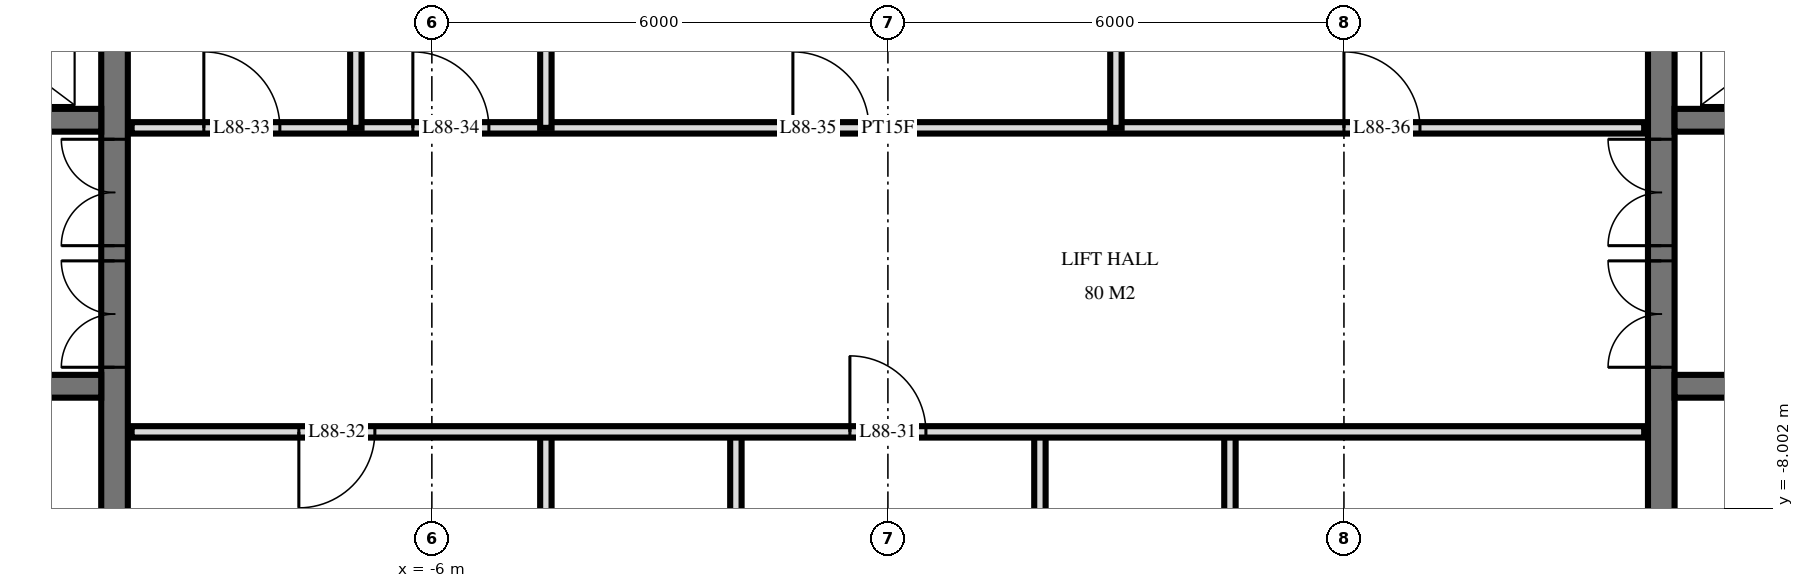
"""IFC4 building model, lengths in metres.
Left out: names, types, materials, properties, quantities, classifications, styles, units other than length and angle.
Written with IfcOpenShell. Run it as: python <this file> out.ifc"""

import sys

from ifc_helpers import new_model, si_unit, direction, frame, frame_2d, origin, place, context, subcontext, project, spatial, rectangle, extrude, element, fill, save


model = new_model("IFC4")
c1 = context("Model", 3, precision=1e-05, world=origin(), true_north=direction((0.0, 1.0)))
c2 = subcontext(c1, "Body", "Model", "MODEL_VIEW")
j1 = project(units=[si_unit("LENGTHUNIT", "METRE"), si_unit("PLANEANGLEUNIT", "RADIAN")], contexts=[c1])
p1 = place(None, origin())
s1 = spatial("IfcSite", under=j1, at=p1, CompositionType="ELEMENT")
p2 = place(p1, origin())
s2 = spatial("IfcBuilding", under=s1, at=p2, CompositionType="ELEMENT")
p3 = place(p2, frame((0.0, 0.0, 334.6)))
s3 = spatial("IfcBuildingStorey", under=s2, at=p3, CompositionType="ELEMENT", Elevation=334.6)
p4 = place(p3, frame((-10.175, -14.55, 0.0), z_axis=(0.0, 0.0, 1.0), x_axis=(0.0, 1.0, 0.0)))
e1 = element("IfcWall", 1, at=p4, inside=s3, PredefinedType="SHEAR", context=c2, shape_type="SweptSolid", body=[
    extrude(rectangle(XDim=14.1, YDim=0.35, at=frame_2d((7.05, 0.0))), origin(), (0.0, 0.0, 1.0), 4.0),
])
p5 = place(p4, frame((8.4, 0.0, 0.0)))
e2 = element("IfcOpeningElement", 2, at=p5, cuts=e1, PredefinedType="OPENING", context=c2, shape_type="SweptSolid", body=[
    extrude(rectangle(XDim=1.4, YDim=2.4, at=frame_2d((0.7, 1.2))), frame((0.0, 0.185, 0.0), z_axis=(0.0, -1.0, 0.0), x_axis=(1.0, 0.0, 0.0)), (0.0, 0.0, 1.0), 0.37),
])
p6 = place(p4, frame((10.0, 0.0, 0.0)))
e3 = element("IfcOpeningElement", 3, at=p6, cuts=e1, PredefinedType="OPENING", context=c2, shape_type="SweptSolid", body=[
    extrude(rectangle(XDim=1.4, YDim=2.4, at=frame_2d((0.7, 1.2))), frame((0.0, 0.185, 0.0), z_axis=(0.0, -1.0, 0.0), x_axis=(1.0, 0.0, 0.0)), (0.0, 0.0, 1.0), 0.37),
])
p7 = place(p4, frame((4.0, 0.0, 0.0)))
e4 = element("IfcOpeningElement", 4, at=p7, cuts=e1, PredefinedType="OPENING", context=c2, shape_type="SweptSolid", body=[
    extrude(rectangle(XDim=1.2, YDim=2.1, at=frame_2d((0.6, 1.05))), frame((0.0, 0.185, 0.0), z_axis=(0.0, -1.0, 0.0), x_axis=(1.0, 0.0, 0.0)), (0.0, 0.0, 1.0), 0.37),
])
p8 = place(p3, frame((-19.05, -2.9, 0.0), z_axis=(0.0, 0.0, 1.0), x_axis=(1.0, 0.0, 0.0)))
e5 = element("IfcWall", 5, at=p8, inside=s3, PredefinedType="SHEAR", context=c2, shape_type="SweptSolid", body=[
    extrude(rectangle(XDim=8.7, YDim=0.3, at=frame_2d((4.35, 0.0))), origin(), (0.0, 0.0, 1.0), 4.0),
])
p9 = place(p8, frame((6.8, 0.0, 0.0)))
e6 = element("IfcOpeningElement", 6, at=p9, cuts=e5, PredefinedType="OPENING", context=c2, shape_type="SweptSolid", body=[
    extrude(rectangle(XDim=1.1, YDim=2.1, at=frame_2d((0.55, 1.05))), frame((0.0, 0.16, 0.0), z_axis=(0.0, -1.0, 0.0), x_axis=(1.0, 0.0, 0.0)), (0.0, 0.0, 1.0), 0.32),
])
p10 = place(p8, frame((3.8, 0.0, 0.0)))
e7 = element("IfcOpeningElement", 7, at=p10, cuts=e5, PredefinedType="OPENING", context=c2, shape_type="SweptSolid", body=[
    extrude(rectangle(XDim=1.1, YDim=2.1, at=frame_2d((0.55, 1.05))), frame((0.0, 0.16, 0.0), z_axis=(0.0, -1.0, 0.0), x_axis=(1.0, 0.0, 0.0)), (0.0, 0.0, 1.0), 0.32),
])
p11 = place(p8, frame((1.613, 0.0, 0.0)))
e8 = element("IfcOpeningElement", 8, at=p11, cuts=e5, PredefinedType="OPENING", context=c2, shape_type="SweptSolid", body=[
    extrude(rectangle(XDim=0.9, YDim=2.1, at=frame_2d((0.45, 1.05))), frame((0.0, 0.16, 0.0), z_axis=(0.0, -1.0, 0.0), x_axis=(1.0, 0.0, 0.0)), (0.0, 0.0, 1.0), 0.32),
])
p12 = place(p8, frame((0.188, 0.0, 0.0)))
e9 = element("IfcOpeningElement", 9, at=p12, cuts=e5, PredefinedType="OPENING", context=c2, shape_type="SweptSolid", body=[
    extrude(rectangle(XDim=0.9, YDim=2.1, at=frame_2d((0.45, 1.05))), frame((0.0, 0.16, 0.0), z_axis=(0.0, -1.0, 0.0), x_axis=(1.0, 0.0, 0.0)), (0.0, 0.0, 1.0), 0.32),
])
p13 = place(p3, frame((-19.05, -6.4, 0.0), z_axis=(0.0, 0.0, 1.0), x_axis=(1.0, 0.0, 0.0)))
e10 = element("IfcWall", 10, at=p13, inside=s3, PredefinedType="SHEAR", context=c2, shape_type="SweptSolid", body=[
    extrude(rectangle(XDim=8.7, YDim=0.3, at=frame_2d((4.35, 0.0))), origin(), (0.0, 0.0, 1.0), 4.0),
])
p14 = place(p13, frame((0.8, 0.0, 0.0)))
e11 = element("IfcOpeningElement", 11, at=p14, cuts=e10, PredefinedType="OPENING", context=c2, shape_type="SweptSolid", body=[
    extrude(rectangle(XDim=1.1, YDim=2.1, at=frame_2d((0.55, 1.05))), frame((0.0, 0.16, 0.0), z_axis=(0.0, -1.0, 0.0), x_axis=(1.0, 0.0, 0.0)), (0.0, 0.0, 1.0), 0.32),
])
p15 = place(p3, frame((10.175, -14.55, 0.0), z_axis=(0.0, 0.0, 1.0), x_axis=(0.0, 1.0, 0.0)))
e12 = element("IfcWall", 12, at=p15, inside=s3, PredefinedType="SHEAR", context=c2, shape_type="SweptSolid", body=[
    extrude(rectangle(XDim=14.1, YDim=0.35, at=frame_2d((7.05, 0.0))), origin(), (0.0, 0.0, 1.0), 4.0),
])
p16 = place(p15, frame((8.4, 0.0, 0.0)))
e13 = element("IfcOpeningElement", 13, at=p16, cuts=e12, PredefinedType="OPENING", context=c2, shape_type="SweptSolid", body=[
    extrude(rectangle(XDim=1.4, YDim=2.4, at=frame_2d((0.7, 1.2))), frame((0.0, 0.185, 0.0), z_axis=(0.0, -1.0, 0.0), x_axis=(1.0, 0.0, 0.0)), (0.0, 0.0, 1.0), 0.37),
])
p17 = place(p15, frame((10.0, 0.0, 0.0)))
e14 = element("IfcOpeningElement", 14, at=p17, cuts=e12, PredefinedType="OPENING", context=c2, shape_type="SweptSolid", body=[
    extrude(rectangle(XDim=1.4, YDim=2.4, at=frame_2d((0.7, 1.2))), frame((0.0, 0.185, 0.0), z_axis=(0.0, -1.0, 0.0), x_axis=(1.0, 0.0, 0.0)), (0.0, 0.0, 1.0), 0.37),
])
p18 = place(p15, frame((4.0, 0.0, 0.0)))
e15 = element("IfcOpeningElement", 15, at=p18, cuts=e12, PredefinedType="OPENING", context=c2, shape_type="SweptSolid", body=[
    extrude(rectangle(XDim=1.2, YDim=2.1, at=frame_2d((0.6, 1.05))), frame((0.0, 0.185, 0.0), z_axis=(0.0, -1.0, 0.0), x_axis=(1.0, 0.0, 0.0)), (0.0, 0.0, 1.0), 0.37),
])
p19 = place(p3, frame((10.35, -2.9, 0.0), z_axis=(0.0, 0.0, 1.0), x_axis=(1.0, 0.0, 0.0)))
e16 = element("IfcWall", 16, at=p19, inside=s3, PredefinedType="SHEAR", context=c2, shape_type="SweptSolid", body=[
    extrude(rectangle(XDim=8.7, YDim=0.3, at=frame_2d((4.35, 0.0))), origin(), (0.0, 0.0, 1.0), 4.0),
])
p20 = place(p19, frame((0.8, 0.0, 0.0)))
e17 = element("IfcOpeningElement", 17, at=p20, cuts=e16, PredefinedType="OPENING", context=c2, shape_type="SweptSolid", body=[
    extrude(rectangle(XDim=1.1, YDim=2.1, at=frame_2d((0.55, 1.05))), frame((0.0, 0.16, 0.0), z_axis=(0.0, -1.0, 0.0), x_axis=(1.0, 0.0, 0.0)), (0.0, 0.0, 1.0), 0.32),
])
p21 = place(p19, frame((3.8, 0.0, 0.0)))
e18 = element("IfcOpeningElement", 18, at=p21, cuts=e16, PredefinedType="OPENING", context=c2, shape_type="SweptSolid", body=[
    extrude(rectangle(XDim=1.1, YDim=2.1, at=frame_2d((0.55, 1.05))), frame((0.0, 0.16, 0.0), z_axis=(0.0, -1.0, 0.0), x_axis=(1.0, 0.0, 0.0)), (0.0, 0.0, 1.0), 0.32),
])
p22 = place(p19, frame((6.188, 0.0, 0.0)))
e19 = element("IfcOpeningElement", 19, at=p22, cuts=e16, PredefinedType="OPENING", context=c2, shape_type="SweptSolid", body=[
    extrude(rectangle(XDim=0.9, YDim=2.1, at=frame_2d((0.45, 1.05))), frame((0.0, 0.16, 0.0), z_axis=(0.0, -1.0, 0.0), x_axis=(1.0, 0.0, 0.0)), (0.0, 0.0, 1.0), 0.32),
])
p23 = place(p19, frame((7.613, 0.0, 0.0)))
e20 = element("IfcOpeningElement", 20, at=p23, cuts=e16, PredefinedType="OPENING", context=c2, shape_type="SweptSolid", body=[
    extrude(rectangle(XDim=0.9, YDim=2.1, at=frame_2d((0.45, 1.05))), frame((0.0, 0.16, 0.0), z_axis=(0.0, -1.0, 0.0), x_axis=(1.0, 0.0, 0.0)), (0.0, 0.0, 1.0), 0.32),
])
p24 = place(p3, frame((10.35, -6.4, 0.0), z_axis=(0.0, 0.0, 1.0), x_axis=(1.0, 0.0, 0.0)))
e21 = element("IfcWall", 21, at=p24, inside=s3, PredefinedType="SHEAR", context=c2, shape_type="SweptSolid", body=[
    extrude(rectangle(XDim=8.7, YDim=0.3, at=frame_2d((4.35, 0.0))), origin(), (0.0, 0.0, 1.0), 4.0),
])
p25 = place(p24, frame((6.8, 0.0, 0.0)))
e22 = element("IfcOpeningElement", 22, at=p25, cuts=e21, PredefinedType="OPENING", context=c2, shape_type="SweptSolid", body=[
    extrude(rectangle(XDim=1.1, YDim=2.1, at=frame_2d((0.55, 1.05))), frame((0.0, 0.16, 0.0), z_axis=(0.0, -1.0, 0.0), x_axis=(1.0, 0.0, 0.0)), (0.0, 0.0, 1.0), 0.32),
])
p26 = place(p3, frame((4.5, -11.0, 0.0), z_axis=(0.0, 0.0, 1.0), x_axis=(0.0, 1.0, 0.0)))
e23 = element("IfcWall", 23, at=p26, inside=s3, PredefinedType="PLUMBINGWALL", context=c2, shape_type="SweptSolid", body=[
    extrude(rectangle(XDim=4.0, YDim=0.15, at=frame_2d((2.0, 0.0))), origin(), (0.0, 0.0, 1.0), 3.72),
])
p27 = place(p3, frame((3.0, -3.0, 0.0), z_axis=(0.0, 0.0, 1.0), x_axis=(0.0, 1.0, 0.0)))
e24 = element("IfcWall", 24, at=p27, inside=s3, PredefinedType="PARTITIONING", context=c2, shape_type="SweptSolid", body=[
    extrude(rectangle(XDim=6.893, YDim=0.15, at=frame_2d((3.446, 0.0))), origin(), (0.0, 0.0, 1.0), 3.72),
])
p28 = place(p3, frame((2.0, -11.0, 0.0), z_axis=(0.0, 0.0, 1.0), x_axis=(0.0, 1.0, 0.0)))
e25 = element("IfcWall", 25, at=p28, inside=s3, PredefinedType="PARTITIONING", context=c2, shape_type="SweptSolid", body=[
    extrude(rectangle(XDim=4.0, YDim=0.15, at=frame_2d((2.0, 0.0))), origin(), (0.0, 0.0, 1.0), 3.72),
])
p29 = place(p28, frame((1.5, 0.0, 0.0)))
e26 = element("IfcOpeningElement", 26, at=p29, cuts=e25, PredefinedType="OPENING", context=c2, shape_type="SweptSolid", body=[
    extrude(rectangle(XDim=1.0, YDim=2.1, at=frame_2d((0.5, 1.05))), frame((0.0, 0.085, 0.0), z_axis=(0.0, -1.0, 0.0), x_axis=(1.0, 0.0, 0.0)), (0.0, 0.0, 1.0), 0.17),
])
p30 = place(p3, frame((-2.0, -11.0, 0.0), z_axis=(0.0, 0.0, 1.0), x_axis=(0.0, 1.0, 0.0)))
e27 = element("IfcWall", 27, at=p30, inside=s3, PredefinedType="PARTITIONING", context=c2, shape_type="SweptSolid", body=[
    extrude(rectangle(XDim=4.0, YDim=0.15, at=frame_2d((2.0, 0.0))), origin(), (0.0, 0.0, 1.0), 3.72),
])
p31 = place(p30, frame((1.5, 0.0, 0.0)))
e28 = element("IfcOpeningElement", 28, at=p31, cuts=e27, PredefinedType="OPENING", context=c2, shape_type="SweptSolid", body=[
    extrude(rectangle(XDim=1.0, YDim=2.1, at=frame_2d((0.5, 1.05))), frame((0.0, 0.085, 0.0), z_axis=(0.0, -1.0, 0.0), x_axis=(1.0, 0.0, 0.0)), (0.0, 0.0, 1.0), 0.17),
])
p32 = place(p3, frame((-4.5, -11.0, 0.0), z_axis=(0.0, 0.0, 1.0), x_axis=(0.0, 1.0, 0.0)))
e29 = element("IfcWall", 29, at=p32, inside=s3, PredefinedType="PLUMBINGWALL", context=c2, shape_type="SweptSolid", body=[
    extrude(rectangle(XDim=4.0, YDim=0.15, at=frame_2d((2.0, 0.0))), origin(), (0.0, 0.0, 1.0), 3.72),
])
p33 = place(p3, frame((-4.5, -3.0, 0.0), z_axis=(0.0, 0.0, 1.0), x_axis=(0.0, 1.0, 0.0)))
e30 = element("IfcWall", 30, at=p33, inside=s3, PredefinedType="PLUMBINGWALL", context=c2, shape_type="SweptSolid", body=[
    extrude(rectangle(XDim=5.972, YDim=0.15, at=frame_2d((2.986, 0.0))), origin(), (0.0, 0.0, 1.0), 3.72),
])
p34 = place(p3, frame((-7.0, -3.0, 0.0), z_axis=(0.0, 0.0, 1.0), x_axis=(0.0, 1.0, 0.0)))
e31 = element("IfcWall", 31, at=p34, inside=s3, PredefinedType="PLUMBINGWALL", context=c2, shape_type="SweptSolid", body=[
    extrude(rectangle(XDim=5.665, YDim=0.15, at=frame_2d((2.833, 0.0))), origin(), (0.0, 0.0, 1.0), 3.72),
])
p35 = place(p3, frame((-9.95, -7.0, 0.0), z_axis=(0.0, 0.0, 1.0), x_axis=(1.0, 0.0, 0.0)))
e32 = element("IfcWall", 32, at=p35, inside=s3, PredefinedType="PARTITIONING", context=c2, shape_type="SweptSolid", body=[
    extrude(rectangle(XDim=19.9, YDim=0.15, at=frame_2d((9.95, 0.0))), origin(), (0.0, 0.0, 1.0), 3.72),
])
p36 = place(p35, frame((9.45, 0.0, 0.0)))
e33 = element("IfcOpeningElement", 33, at=p36, cuts=e32, PredefinedType="OPENING", context=c2, shape_type="SweptSolid", body=[
    extrude(rectangle(XDim=1.0, YDim=2.1, at=frame_2d((0.5, 1.05))), frame((0.0, 0.085, 0.0), z_axis=(0.0, -1.0, 0.0), x_axis=(1.0, 0.0, 0.0)), (0.0, 0.0, 1.0), 0.17),
])
p37 = place(p35, frame((2.2, 0.0, 0.0)))
e34 = element("IfcOpeningElement", 34, at=p37, cuts=e32, PredefinedType="OPENING", context=c2, shape_type="SweptSolid", body=[
    extrude(rectangle(XDim=1.0, YDim=2.1, at=frame_2d((0.5, 1.05))), frame((0.0, 0.085, 0.0), z_axis=(0.0, -1.0, 0.0), x_axis=(1.0, 0.0, 0.0)), (0.0, 0.0, 1.0), 0.17),
])
p38 = place(p3, frame((-9.95, -3.0, 0.0), z_axis=(0.0, 0.0, 1.0), x_axis=(1.0, 0.0, 0.0)))
e35 = element("IfcWall", 35, at=p38, inside=s3, PredefinedType="PARTITIONING", context=c2, shape_type="SweptSolid", body=[
    extrude(rectangle(XDim=19.9, YDim=0.15, at=frame_2d((9.95, 0.0))), origin(), (0.0, 0.0, 1.0), 3.72),
])
p39 = place(p38, frame((0.95, 0.0, 0.0)))
e36 = element("IfcOpeningElement", 36, at=p39, cuts=e35, PredefinedType="OPENING", context=c2, shape_type="SweptSolid", body=[
    extrude(rectangle(XDim=1.0, YDim=2.1, at=frame_2d((0.5, 1.05))), frame((0.0, 0.085, 0.0), z_axis=(0.0, -1.0, 0.0), x_axis=(1.0, 0.0, 0.0)), (0.0, 0.0, 1.0), 0.17),
])
p40 = place(p38, frame((3.7, 0.0, 0.0)))
e37 = element("IfcOpeningElement", 37, at=p40, cuts=e35, PredefinedType="OPENING", context=c2, shape_type="SweptSolid", body=[
    extrude(rectangle(XDim=1.0, YDim=2.1, at=frame_2d((0.5, 1.05))), frame((0.0, 0.085, 0.0), z_axis=(0.0, -1.0, 0.0), x_axis=(1.0, 0.0, 0.0)), (0.0, 0.0, 1.0), 0.17),
])
p41 = place(p38, frame((8.7, 0.0, 0.0)))
e38 = element("IfcOpeningElement", 38, at=p41, cuts=e35, PredefinedType="OPENING", context=c2, shape_type="SweptSolid", body=[
    extrude(rectangle(XDim=1.0, YDim=2.1, at=frame_2d((0.5, 1.05))), frame((0.0, 0.085, 0.0), z_axis=(0.0, -1.0, 0.0), x_axis=(1.0, 0.0, 0.0)), (0.0, 0.0, 1.0), 0.17),
])
p42 = place(p38, frame((15.95, 0.0, 0.0)))
e39 = element("IfcOpeningElement", 39, at=p42, cuts=e35, PredefinedType="OPENING", context=c2, shape_type="SweptSolid", body=[
    extrude(rectangle(XDim=1.0, YDim=2.1, at=frame_2d((0.5, 1.05))), frame((0.0, 0.085, 0.0), z_axis=(0.0, -1.0, 0.0), x_axis=(1.0, 0.0, 0.0)), (0.0, 0.0, 1.0), 0.17),
])
p43 = place(p5, origin())
e40 = element("IfcDoor", 40, at=p43, inside=s3, OperationType="DOUBLE_DOOR_SINGLE_SWING", PredefinedType="DOOR", context=c2, shape_type="SweptSolid", body=[
    extrude(rectangle(XDim=1.4, YDim=2.4, at=frame_2d((0.7, 1.2))), frame((0.0, 0.025, 0.0), z_axis=(0.0, -1.0, 0.0), x_axis=(1.0, 0.0, 0.0)), (0.0, 0.0, 1.0), 0.05),
])
fill(e2, e40)
p44 = place(p6, origin())
e41 = element("IfcDoor", 41, at=p44, inside=s3, OperationType="DOUBLE_DOOR_SINGLE_SWING", PredefinedType="DOOR", context=c2, shape_type="SweptSolid", body=[
    extrude(rectangle(XDim=1.4, YDim=2.4, at=frame_2d((0.7, 1.2))), frame((0.0, 0.025, 0.0), z_axis=(0.0, -1.0, 0.0), x_axis=(1.0, 0.0, 0.0)), (0.0, 0.0, 1.0), 0.05),
])
fill(e3, e41)
p45 = place(p16, origin())
e42 = element("IfcDoor", 42, at=p45, inside=s3, OperationType="DOUBLE_DOOR_SINGLE_SWING", PredefinedType="DOOR", context=c2, shape_type="SweptSolid", body=[
    extrude(rectangle(XDim=1.4, YDim=2.4, at=frame_2d((0.7, 1.2))), frame((0.0, 0.025, 0.0), z_axis=(0.0, -1.0, 0.0), x_axis=(1.0, 0.0, 0.0)), (0.0, 0.0, 1.0), 0.05),
])
fill(e13, e42)
p46 = place(p17, origin())
e43 = element("IfcDoor", 43, at=p46, inside=s3, OperationType="DOUBLE_DOOR_SINGLE_SWING", PredefinedType="DOOR", context=c2, shape_type="SweptSolid", body=[
    extrude(rectangle(XDim=1.4, YDim=2.4, at=frame_2d((0.7, 1.2))), frame((0.0, 0.025, 0.0), z_axis=(0.0, -1.0, 0.0), x_axis=(1.0, 0.0, 0.0)), (0.0, 0.0, 1.0), 0.05),
])
fill(e14, e43)
p47 = place(p36, origin())
e44 = element("IfcDoor", 44, at=p47, inside=s3, OperationType="SINGLE_SWING_RIGHT", PredefinedType="DOOR", context=c2, shape_type="SweptSolid", body=[
    extrude(rectangle(XDim=1.0, YDim=2.1, at=frame_2d((0.5, 1.05))), frame((0.0, 0.025, 0.0), z_axis=(0.0, -1.0, 0.0), x_axis=(1.0, 0.0, 0.0)), (0.0, 0.0, 1.0), 0.05),
])
fill(e33, e44)
p48 = place(p37, frame((0.5, 0.0, 0.0), z_axis=(0.0, 0.0, 1.0), x_axis=(-1.0, 0.0, 0.0)))
e45 = element("IfcDoor", 45, at=p48, inside=s3, OperationType="SINGLE_SWING_LEFT", PredefinedType="DOOR", context=c2, shape_type="SweptSolid", body=[
    extrude(rectangle(XDim=1.0, YDim=2.1, at=frame_2d((0.0, 1.05))), frame((0.0, -0.025, 0.0), z_axis=(0.0, 1.0, 0.0), x_axis=(-1.0, 0.0, 0.0)), (0.0, 0.0, 1.0), 0.05),
])
fill(e34, e45)
p49 = place(p39, origin())
e46 = element("IfcDoor", 46, at=p49, inside=s3, OperationType="SINGLE_SWING_RIGHT", PredefinedType="DOOR", context=c2, shape_type="SweptSolid", body=[
    extrude(rectangle(XDim=1.0, YDim=2.1, at=frame_2d((0.5, 1.05))), frame((0.0, 0.025, 0.0), z_axis=(0.0, -1.0, 0.0), x_axis=(1.0, 0.0, 0.0)), (0.0, 0.0, 1.0), 0.05),
])
fill(e36, e46)
p50 = place(p40, origin())
e47 = element("IfcDoor", 47, at=p50, inside=s3, OperationType="SINGLE_SWING_RIGHT", PredefinedType="DOOR", context=c2, shape_type="SweptSolid", body=[
    extrude(rectangle(XDim=1.0, YDim=2.1, at=frame_2d((0.5, 1.05))), frame((0.0, 0.025, 0.0), z_axis=(0.0, -1.0, 0.0), x_axis=(1.0, 0.0, 0.0)), (0.0, 0.0, 1.0), 0.05),
])
fill(e37, e47)
p51 = place(p41, origin())
e48 = element("IfcDoor", 48, at=p51, inside=s3, OperationType="SINGLE_SWING_RIGHT", PredefinedType="DOOR", context=c2, shape_type="SweptSolid", body=[
    extrude(rectangle(XDim=1.0, YDim=2.1, at=frame_2d((0.5, 1.05))), frame((0.0, 0.025, 0.0), z_axis=(0.0, -1.0, 0.0), x_axis=(1.0, 0.0, 0.0)), (0.0, 0.0, 1.0), 0.05),
])
fill(e38, e48)
p52 = place(p42, origin())
e49 = element("IfcDoor", 49, at=p52, inside=s3, OperationType="SINGLE_SWING_RIGHT", PredefinedType="DOOR", context=c2, shape_type="SweptSolid", body=[
    extrude(rectangle(XDim=1.0, YDim=2.1, at=frame_2d((0.5, 1.05))), frame((0.0, 0.025, 0.0), z_axis=(0.0, -1.0, 0.0), x_axis=(1.0, 0.0, 0.0)), (0.0, 0.0, 1.0), 0.05),
])
fill(e39, e49)
save(model, sys.argv[1])
